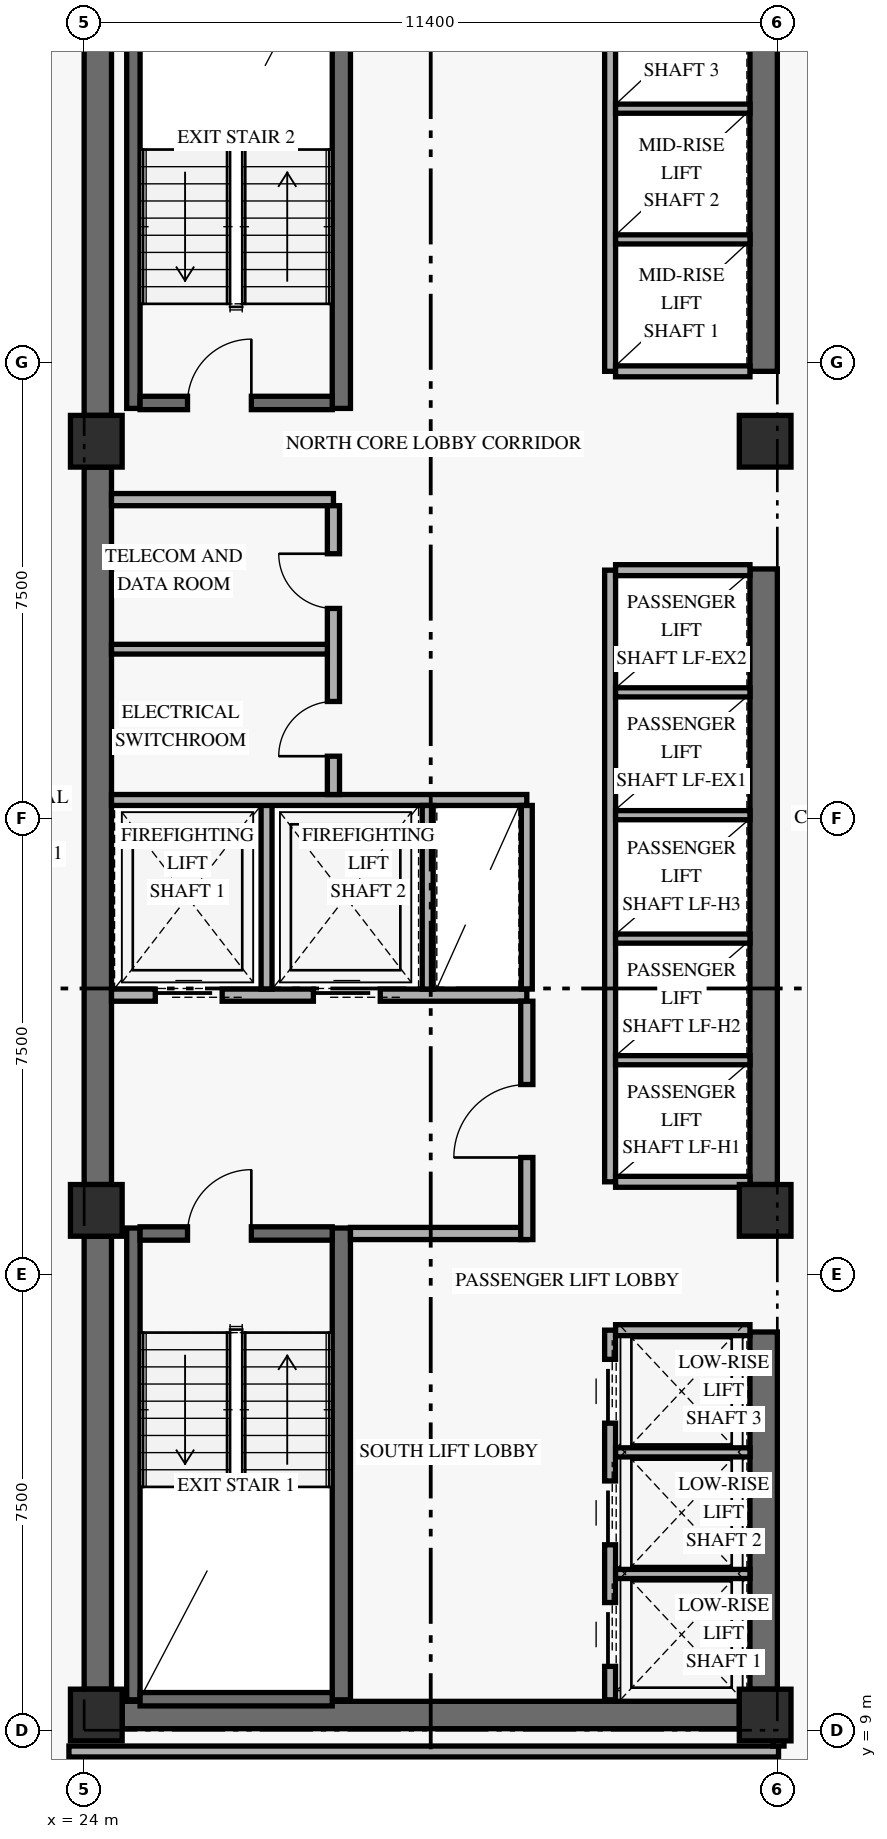
"""IFC4 building model, lengths in metres.
Left out: names, types, materials, properties, quantities, classifications, styles, units other than length and angle.
Written with IfcOpenShell. Run it as: python <this file> out.ifc"""

import sys

from ifc_helpers import new_model, si_unit, direction, frame, frame_2d, origin, origin_2d, place, context, subcontext, project, spatial, rectangle, extrude, element, fill, save


model = new_model("IFC4")
c1 = context("Model", 3, precision=1e-05, world=origin(), true_north=direction((0.0, 1.0)))
c2 = subcontext(c1, "Body", "Model", "MODEL_VIEW")
j1 = project(units=[si_unit("LENGTHUNIT", "METRE"), si_unit("PLANEANGLEUNIT", "RADIAN")], contexts=[c1])
p1 = place(None, origin())
s1 = spatial("IfcSite", under=j1, at=p1, CompositionType="ELEMENT")
p2 = place(p1, origin())
s2 = spatial("IfcBuilding", under=s1, at=p2, CompositionType="ELEMENT")
p3 = place(p2, frame((0.0, 0.0, 27.6)))
s3 = spatial("IfcBuildingStorey", under=s2, at=p3, CompositionType="ELEMENT", Elevation=27.6)
p4 = place(p3, frame((24.225, 9.675, 0.0), z_axis=(0.0, 0.0, 1.0), x_axis=(0.0, 1.0, 0.0)))
e1 = element("IfcWall", 1, at=p4, inside=s3, PredefinedType="SHEAR", context=c2, shape_type="SweptSolid", body=[
    extrude(rectangle(XDim=7.45, YDim=0.45, at=frame_2d((3.725, 0.0))), origin(), (0.0, 0.0, 1.0), 2.667),
])
p5 = place(p3, frame((24.225, 17.975, 0.0), z_axis=(0.0, 0.0, 1.0), x_axis=(0.0, 1.0, 0.0)))
e2 = element("IfcWall", 2, at=p5, inside=s3, PredefinedType="SHEAR", context=c2, shape_type="SweptSolid", body=[
    extrude(rectangle(XDim=11.8, YDim=0.45, at=frame_2d((5.9, 0.0))), origin(), (0.0, 0.0, 1.0), 2.667),
])
p6 = place(p3, frame((24.225, 30.625, 0.0), z_axis=(0.0, 0.0, 1.0), x_axis=(0.0, 1.0, 0.0)))
e3 = element("IfcWall", 3, at=p6, inside=s3, PredefinedType="SHEAR", context=c2, shape_type="SweptSolid", body=[
    extrude(rectangle(XDim=7.7, YDim=0.45, at=frame_2d((3.85, 0.0))), origin(), (0.0, 0.0, 1.0), 2.667),
])
p7 = place(p3, frame((35.175, 9.675, 0.0), z_axis=(0.0, 0.0, 1.0), x_axis=(0.0, 1.0, 0.0)))
e4 = element("IfcWall", 4, at=p7, inside=s3, PredefinedType="SHEAR", context=c2, shape_type="SweptSolid", body=[
    extrude(rectangle(XDim=5.875, YDim=0.45, at=frame_2d((2.938, 0.0))), origin(), (0.0, 0.0, 1.0), 2.667),
])
p8 = place(p3, frame((35.175, 17.975, 0.0), z_axis=(0.0, 0.0, 1.0), x_axis=(0.0, 1.0, 0.0)))
e5 = element("IfcWall", 5, at=p8, inside=s3, PredefinedType="SHEAR", context=c2, shape_type="SweptSolid", body=[
    extrude(rectangle(XDim=10.125, YDim=0.45, at=frame_2d((5.062, 0.0))), origin(), (0.0, 0.0, 1.0), 2.667),
])
p9 = place(p3, frame((35.175, 31.35, 0.0), z_axis=(0.0, 0.0, 1.0), x_axis=(0.0, 1.0, 0.0)))
e6 = element("IfcWall", 6, at=p9, inside=s3, PredefinedType="SHEAR", context=c2, shape_type="SweptSolid", body=[
    extrude(rectangle(XDim=6.975, YDim=0.45, at=frame_2d((3.487, 0.0))), origin(), (0.0, 0.0, 1.0), 2.667),
])
p10 = place(p3, frame((24.625, 9.25, 0.0), z_axis=(0.0, 0.0, 1.0), x_axis=(1.0, 0.0, 0.0)))
e7 = element("IfcWall", 7, at=p10, inside=s3, PredefinedType="SHEAR", context=c2, shape_type="SweptSolid", body=[
    extrude(rectangle(XDim=10.15, YDim=0.45, at=frame_2d((5.075, 0.0))), origin(), (0.0, 0.0, 1.0), 3.36),
])
p11 = place(p3, frame((24.81, 9.5, 0.0), z_axis=(0.0, 0.0, 1.0), x_axis=(0.0, 1.0, 0.0)))
e8 = element("IfcWall", 8, at=p11, inside=s3, PredefinedType="SHEAR", context=c2, shape_type="SweptSolid", body=[
    extrude(rectangle(XDim=7.76, YDim=0.22, at=frame_2d((3.88, 0.0))), origin(), (0.0, 0.0, 1.0), 3.36),
])
p12 = place(p3, frame((28.23, 9.5, 0.0), z_axis=(0.0, 0.0, 1.0), x_axis=(0.0, 1.0, 0.0)))
e9 = element("IfcWall", 9, at=p12, inside=s3, PredefinedType="SHEAR", context=c2, shape_type="SweptSolid", body=[
    extrude(rectangle(XDim=7.76, YDim=0.3, at=frame_2d((3.88, 0.0))), origin(), (0.0, 0.0, 1.0), 3.36),
])
p13 = place(p3, frame((24.92, 9.51, 0.0), z_axis=(0.0, 0.0, 1.0), x_axis=(1.0, 0.0, 0.0)))
e10 = element("IfcWall", 10, at=p13, inside=s3, PredefinedType="SHEAR", context=c2, shape_type="SweptSolid", body=[
    extrude(rectangle(XDim=3.16, YDim=0.22, at=frame_2d((1.58, 0.0))), origin(), (0.0, 0.0, 1.0), 3.36),
])
p14 = place(p3, frame((24.92, 17.17, 0.0), z_axis=(0.0, 0.0, 1.0), x_axis=(1.0, 0.0, 0.0)))
e11 = element("IfcWall", 11, at=p14, inside=s3, PredefinedType="SHEAR", context=c2, shape_type="SweptSolid", body=[
    extrude(rectangle(XDim=3.16, YDim=0.22, at=frame_2d((1.58, 0.0))), origin(), (0.0, 0.0, 1.0), 3.36),
])
p15 = place(p14, frame((0.78, 0.0, 0.0)))
e12 = element("IfcOpeningElement", 12, at=p15, cuts=e11, PredefinedType="OPENING", context=c2, shape_type="SweptSolid", body=[
    extrude(rectangle(XDim=1.05, YDim=2.15, at=frame_2d((0.525, 1.075))), frame((0.0, 0.12, 0.0), z_axis=(0.0, -1.0, 0.0), x_axis=(1.0, 0.0, 0.0)), (0.0, 0.0, 1.0), 0.24),
])
p16 = place(p3, frame((24.81, 30.74, 0.0), z_axis=(0.0, 0.0, 1.0), x_axis=(0.0, 1.0, 0.0)))
e13 = element("IfcWall", 13, at=p16, inside=s3, PredefinedType="SHEAR", context=c2, shape_type="SweptSolid", body=[
    extrude(rectangle(XDim=7.76, YDim=0.22, at=frame_2d((3.88, 0.0))), origin(), (0.0, 0.0, 1.0), 3.36),
])
p17 = place(p3, frame((28.23, 30.74, 0.0), z_axis=(0.0, 0.0, 1.0), x_axis=(0.0, 1.0, 0.0)))
e14 = element("IfcWall", 14, at=p17, inside=s3, PredefinedType="SHEAR", context=c2, shape_type="SweptSolid", body=[
    extrude(rectangle(XDim=7.76, YDim=0.3, at=frame_2d((3.88, 0.0))), origin(), (0.0, 0.0, 1.0), 3.36),
])
p18 = place(p3, frame((24.92, 30.83, 0.0), z_axis=(0.0, 0.0, 1.0), x_axis=(1.0, 0.0, 0.0)))
e15 = element("IfcWall", 15, at=p18, inside=s3, PredefinedType="SHEAR", context=c2, shape_type="SweptSolid", body=[
    extrude(rectangle(XDim=3.16, YDim=0.22, at=frame_2d((1.58, 0.0))), origin(), (0.0, 0.0, 1.0), 3.36),
])
p19 = place(p18, frame((0.78, 0.0, 0.0)))
e16 = element("IfcOpeningElement", 16, at=p19, cuts=e15, PredefinedType="OPENING", context=c2, shape_type="SweptSolid", body=[
    extrude(rectangle(XDim=1.05, YDim=2.15, at=frame_2d((0.525, 1.075))), frame((0.0, 0.12, 0.0), z_axis=(0.0, -1.0, 0.0), x_axis=(1.0, 0.0, 0.0)), (0.0, 0.0, 1.0), 0.24),
])
for number, where, z_axis, x_axis in (
    (17, (24.2, 9.25, 0.0), (0.0, 0.0, 1.0), (1.0, 0.0, 0.0)),
    (18, (24.2, 17.55, 0.0), (0.0, 0.0, 1.0), (1.0, 0.0, 0.0)),
    (19, (24.2, 30.2, 0.0), (0.0, 0.0, 1.0), (1.0, 0.0, 0.0)),
    (20, (35.2, 9.25, 0.0), (0.0, 0.0, 1.0), (1.0, 0.0, 0.0)),
    (21, (35.2, 17.55, 0.0), (0.0, 0.0, 1.0), (1.0, 0.0, 0.0)),
    (22, (35.2, 30.2, 0.0), (0.0, 0.0, 1.0), (1.0, 0.0, 0.0)),
):
    element("IfcColumn", number, at=place(p3, frame(where, z_axis=z_axis, x_axis=x_axis)), inside=s3, PredefinedType="COLUMN", context=c2, shape_type="SweptSolid", body=[
        extrude(rectangle(XDim=0.85, YDim=0.85, at=origin_2d()), origin(), (0.0, 0.0, 1.0), 3.6),
    ])
p20 = place(p3, frame((24.45, 21.09, 0.0), z_axis=(0.0, 0.0, 1.0), x_axis=(1.0, 0.0, 0.0)))
e23 = element("IfcWall", 23, at=p20, inside=s3, PredefinedType="STANDARD", context=c2, shape_type="SweptSolid", body=[
    extrude(rectangle(XDim=6.83, YDim=0.2, at=frame_2d((3.415, 0.0))), origin(), (0.0, 0.0, 1.0), 3.36),
])
p21 = place(p20, frame((0.72, 0.0, 0.0)))
e24 = element("IfcOpeningElement", 24, at=p21, cuts=e23, PredefinedType="OPENING", context=c2, shape_type="SweptSolid", body=[
    extrude(rectangle(XDim=1.1, YDim=2.2, at=frame_2d((0.55, 1.1))), frame((0.0, 0.11, 0.0), z_axis=(0.0, -1.0, 0.0), x_axis=(1.0, 0.0, 0.0)), (0.0, 0.0, 1.0), 0.22),
])
p22 = place(p20, frame((3.32, 0.0, 0.0)))
e25 = element("IfcOpeningElement", 25, at=p22, cuts=e23, PredefinedType="OPENING", context=c2, shape_type="SweptSolid", body=[
    extrude(rectangle(XDim=1.1, YDim=2.2, at=frame_2d((0.55, 1.1))), frame((0.0, 0.11, 0.0), z_axis=(0.0, -1.0, 0.0), x_axis=(1.0, 0.0, 0.0)), (0.0, 0.0, 1.0), 0.22),
])
p23 = place(p3, frame((28.38, 17.17, 0.0), z_axis=(0.0, 0.0, 1.0), x_axis=(1.0, 0.0, 0.0)))
e26 = element("IfcWall", 26, at=p23, inside=s3, PredefinedType="STANDARD", context=c2, shape_type="SweptSolid", body=[
    extrude(rectangle(XDim=2.9, YDim=0.2, at=frame_2d((1.45, 0.0))), origin(), (0.0, 0.0, 1.0), 3.36),
])
p24 = place(p3, frame((31.28, 17.07, 0.0), z_axis=(0.0, 0.0, 1.0), x_axis=(0.0, 1.0, 0.0)))
e27 = element("IfcWall", 27, at=p24, inside=s3, PredefinedType="STANDARD", context=c2, shape_type="SweptSolid", body=[
    extrude(rectangle(XDim=3.92, YDim=0.2, at=frame_2d((1.96, 0.0))), origin(), (0.0, 0.0, 1.0), 2.649),
])
p25 = place(p24, frame((1.35, 0.0, 0.0)))
e28 = element("IfcOpeningElement", 28, at=p25, cuts=e27, PredefinedType="OPENING", context=c2, shape_type="SweptSolid", body=[
    extrude(rectangle(XDim=1.2, YDim=2.15, at=frame_2d((0.6, 1.075))), frame((0.0, 0.11, 0.0), z_axis=(0.0, -1.0, 0.0), x_axis=(1.0, 0.0, 0.0)), (0.0, 0.0, 1.0), 0.22),
])
p26 = place(p3, frame((27.0, 21.19, 0.0), z_axis=(0.0, 0.0, 1.0), x_axis=(0.0, 1.0, 0.0)))
e29 = element("IfcWall", 29, at=p26, inside=s3, PredefinedType="STANDARD", context=c2, shape_type="SweptSolid", body=[
    extrude(rectangle(XDim=3.11, YDim=0.18, at=frame_2d((1.555, 0.0))), origin(), (0.0, 0.0, 1.0), 3.36),
])
p27 = place(p3, frame((24.45, 24.3, 0.0), z_axis=(0.0, 0.0, 1.0), x_axis=(1.0, 0.0, 0.0)))
e30 = element("IfcWall", 30, at=p27, inside=s3, PredefinedType="STANDARD", context=c2, shape_type="SweptSolid", body=[
    extrude(rectangle(XDim=6.83, YDim=0.18, at=frame_2d((3.415, 0.0))), origin(), (0.0, 0.0, 1.0), 3.36),
])
for number, where, z_axis, x_axis in (
    (31, (29.65, 21.19, 0.0), (0.0, 0.0, 1.0), (0.0, 1.0, 0.0)),
    (32, (31.28, 21.19, 0.0), (0.0, 0.0, 1.0), (0.0, 1.0, 0.0)),
):
    element("IfcWall", number, at=place(p3, frame(where, z_axis=z_axis, x_axis=x_axis)), inside=s3, PredefinedType="STANDARD", context=c2, shape_type="SweptSolid", body=[
        extrude(rectangle(XDim=3.02, YDim=0.18, at=frame_2d((1.51, 0.0))), origin(), (0.0, 0.0, 1.0), 3.36),
    ])
p28 = place(p3, frame((24.45, 29.24, 0.0), z_axis=(0.0, 0.0, 1.0), x_axis=(1.0, 0.0, 0.0)))
e33 = element("IfcWall", 33, at=p28, inside=s3, PredefinedType="STANDARD", context=c2, shape_type="SweptSolid", body=[
    extrude(rectangle(XDim=3.65, YDim=0.2, at=frame_2d((1.825, 0.0))), origin(), (0.0, 0.0, 1.0), 3.36),
])
p29 = place(p3, frame((28.1, 24.39, 0.0), z_axis=(0.0, 0.0, 1.0), x_axis=(0.0, 1.0, 0.0)))
e34 = element("IfcWall", 34, at=p29, inside=s3, PredefinedType="STANDARD", context=c2, shape_type="SweptSolid", body=[
    extrude(rectangle(XDim=4.75, YDim=0.2, at=frame_2d((2.375, 0.0))), origin(), (0.0, 0.0, 1.0), 3.36),
])
p30 = place(p29, frame((0.63, 0.0, 0.0)))
e35 = element("IfcOpeningElement", 35, at=p30, cuts=e34, PredefinedType="OPENING", context=c2, shape_type="SweptSolid", body=[
    extrude(rectangle(XDim=0.9, YDim=2.1, at=frame_2d((0.45, 1.05))), frame((0.0, 0.11, 0.0), z_axis=(0.0, -1.0, 0.0), x_axis=(1.0, 0.0, 0.0)), (0.0, 0.0, 1.0), 0.22),
])
p31 = place(p29, frame((3.06, 0.0, 0.0)))
e36 = element("IfcOpeningElement", 36, at=p31, cuts=e34, PredefinedType="OPENING", context=c2, shape_type="SweptSolid", body=[
    extrude(rectangle(XDim=0.9, YDim=2.1, at=frame_2d((0.45, 1.05))), frame((0.0, 0.11, 0.0), z_axis=(0.0, -1.0, 0.0), x_axis=(1.0, 0.0, 0.0)), (0.0, 0.0, 1.0), 0.22),
])
p32 = place(p3, frame((24.45, 26.78, 0.0), z_axis=(0.0, 0.0, 1.0), x_axis=(1.0, 0.0, 0.0)))
e37 = element("IfcWall", 37, at=p32, inside=s3, PredefinedType="PARTITIONING", context=c2, shape_type="SweptSolid", body=[
    extrude(rectangle(XDim=3.55, YDim=0.16, at=frame_2d((1.775, 0.0))), origin(), (0.0, 0.0, 1.0), 3.36),
])
p33 = place(p3, frame((32.65, 9.5, 0.0), z_axis=(0.0, 0.0, 1.0), x_axis=(0.0, 1.0, 0.0)))
e38 = element("IfcWall", 38, at=p33, inside=s3, PredefinedType="STANDARD", context=c2, shape_type="SweptSolid", body=[
    extrude(rectangle(XDim=6.08, YDim=0.18, at=frame_2d((3.04, 0.0))), origin(), (0.0, 0.0, 1.0), 3.36),
])
p34 = place(p33, frame((0.55, 0.0, 0.0)))
e39 = element("IfcOpeningElement", 39, at=p34, cuts=e38, PredefinedType="OPENING", context=c2, shape_type="SweptSolid", body=[
    extrude(rectangle(XDim=1.05, YDim=2.2, at=frame_2d((0.525, 1.1))), frame((0.0, 0.1, 0.0), z_axis=(0.0, -1.0, 0.0), x_axis=(1.0, 0.0, 0.0)), (0.0, 0.0, 1.0), 0.2),
])
p35 = place(p33, frame((2.55, 0.0, 0.0)))
e40 = element("IfcOpeningElement", 40, at=p35, cuts=e38, PredefinedType="OPENING", context=c2, shape_type="SweptSolid", body=[
    extrude(rectangle(XDim=1.05, YDim=2.2, at=frame_2d((0.525, 1.1))), frame((0.0, 0.1, 0.0), z_axis=(0.0, -1.0, 0.0), x_axis=(1.0, 0.0, 0.0)), (0.0, 0.0, 1.0), 0.2),
])
p36 = place(p33, frame((4.55, 0.0, 0.0)))
e41 = element("IfcOpeningElement", 41, at=p36, cuts=e38, PredefinedType="OPENING", context=c2, shape_type="SweptSolid", body=[
    extrude(rectangle(XDim=1.05, YDim=2.2, at=frame_2d((0.525, 1.1))), frame((0.0, 0.1, 0.0), z_axis=(0.0, -1.0, 0.0), x_axis=(1.0, 0.0, 0.0)), (0.0, 0.0, 1.0), 0.2),
])
p37 = place(p3, frame((32.74, 15.58, 0.0), z_axis=(0.0, 0.0, 1.0), x_axis=(1.0, 0.0, 0.0)))
e42 = element("IfcWall", 42, at=p37, inside=s3, PredefinedType="STANDARD", context=c2, shape_type="SweptSolid", body=[
    extrude(rectangle(XDim=2.21, YDim=0.18, at=frame_2d((1.105, 0.0))), origin(), (0.0, 0.0, 1.0), 3.36),
])
for number, where, z_axis, x_axis in (
    (43, (32.74, 11.57, 0.0), (0.0, 0.0, 1.0), (1.0, 0.0, 0.0)),
    (44, (32.74, 13.57, 0.0), (0.0, 0.0, 1.0), (1.0, 0.0, 0.0)),
):
    element("IfcWall", number, at=place(p3, frame(where, z_axis=z_axis, x_axis=x_axis)), inside=s3, PredefinedType="STANDARD", context=c2, shape_type="SweptSolid", body=[
        extrude(rectangle(XDim=2.21, YDim=0.15, at=frame_2d((1.105, 0.0))), origin(), (0.0, 0.0, 1.0), 3.36),
    ])
p38 = place(p3, frame((32.65, 18.02, 0.0), z_axis=(0.0, 0.0, 1.0), x_axis=(0.0, 1.0, 0.0)))
e45 = element("IfcWall", 45, at=p38, inside=s3, PredefinedType="STANDARD", context=c2, shape_type="SweptSolid", body=[
    extrude(rectangle(XDim=10.06, YDim=0.18, at=frame_2d((5.03, 0.0))), origin(), (0.0, 0.0, 1.0), 3.36),
])
for number, where, z_axis, x_axis in (
    (46, (32.74, 18.02, 0.0), (0.0, 0.0, 1.0), (1.0, 0.0, 0.0)),
    (47, (32.74, 28.08, 0.0), (0.0, 0.0, 1.0), (1.0, 0.0, 0.0)),
):
    element("IfcWall", number, at=place(p3, frame(where, z_axis=z_axis, x_axis=x_axis)), inside=s3, PredefinedType="STANDARD", context=c2, shape_type="SweptSolid", body=[
        extrude(rectangle(XDim=2.21, YDim=0.18, at=frame_2d((1.105, 0.0))), origin(), (0.0, 0.0, 1.0), 3.36),
    ])
for number, where, z_axis, x_axis in (
    (48, (32.74, 20.02, 0.0), (0.0, 0.0, 1.0), (1.0, 0.0, 0.0)),
    (49, (32.74, 22.02, 0.0), (0.0, 0.0, 1.0), (1.0, 0.0, 0.0)),
    (50, (32.74, 24.05, 0.0), (0.0, 0.0, 1.0), (1.0, 0.0, 0.0)),
    (51, (32.74, 26.07, 0.0), (0.0, 0.0, 1.0), (1.0, 0.0, 0.0)),
):
    element("IfcWall", number, at=place(p3, frame(where, z_axis=z_axis, x_axis=x_axis)), inside=s3, PredefinedType="STANDARD", context=c2, shape_type="SweptSolid", body=[
        extrude(rectangle(XDim=2.21, YDim=0.15, at=frame_2d((1.105, 0.0))), origin(), (0.0, 0.0, 1.0), 3.36),
    ])
p39 = place(p3, frame((32.65, 31.35, 0.0), z_axis=(0.0, 0.0, 1.0), x_axis=(0.0, 1.0, 0.0)))
e52 = element("IfcWall", 52, at=p39, inside=s3, PredefinedType="STANDARD", context=c2, shape_type="SweptSolid", body=[
    extrude(rectangle(XDim=7.175, YDim=0.18, at=frame_2d((3.587, 0.0))), origin(), (0.0, 0.0, 1.0), 3.36),
])
p40 = place(p3, frame((32.74, 31.35, 0.0), z_axis=(0.0, 0.0, 1.0), x_axis=(1.0, 0.0, 0.0)))
e53 = element("IfcWall", 53, at=p40, inside=s3, PredefinedType="STANDARD", context=c2, shape_type="SweptSolid", body=[
    extrude(rectangle(XDim=2.21, YDim=0.18, at=frame_2d((1.105, 0.0))), origin(), (0.0, 0.0, 1.0), 3.36),
])
for number, where, z_axis, x_axis in (
    (54, (32.74, 33.52, 0.0), (0.0, 0.0, 1.0), (1.0, 0.0, 0.0)),
    (55, (32.74, 35.67, 0.0), (0.0, 0.0, 1.0), (1.0, 0.0, 0.0)),
):
    element("IfcWall", number, at=place(p3, frame(where, z_axis=z_axis, x_axis=x_axis)), inside=s3, PredefinedType="STANDARD", context=c2, shape_type="SweptSolid", body=[
        extrude(rectangle(XDim=2.21, YDim=0.15, at=frame_2d((1.105, 0.0))), origin(), (0.0, 0.0, 1.0), 3.36),
    ])
p41 = place(p3, frame((23.75, 8.65, 0.0), z_axis=(0.0, 0.0, 1.0), x_axis=(1.0, 0.0, 0.0)))
e56 = element("IfcWall", 56, at=p41, inside=s3, PredefinedType="STANDARD", context=c2, shape_type="SweptSolid", body=[
    extrude(rectangle(XDim=11.67, YDim=0.18, at=frame_2d((5.835, 0.0))), origin(), (0.0, 0.0, 1.0), 2.649),
])
p42 = place(p3, frame((35.42, 8.74, 0.0), z_axis=(0.0, 0.0, 1.0), x_axis=(0.0, 1.0, 0.0)))
e57 = element("IfcWall", 57, at=p42, inside=s3, PredefinedType="STANDARD", context=c2, shape_type="SweptSolid", body=[
    extrude(rectangle(XDim=0.51, YDim=0.18, at=frame_2d((0.255, 0.0))), origin(), (0.0, 0.0, 1.0), 3.36),
])
p43 = place(p15, frame((1.05, 0.0, 0.0), z_axis=(0.0, 0.0, 1.0), x_axis=(-1.0, 0.0, 0.0)))
e58 = element("IfcDoor", 58, at=p43, inside=s3, OperationType="SINGLE_SWING_LEFT", PredefinedType="DOOR", context=c2, shape_type="SweptSolid", body=[
    extrude(rectangle(XDim=1.05, YDim=2.15, at=frame_2d((0.525, 1.075))), frame((0.0, 0.025, 0.0), z_axis=(0.0, -1.0, 0.0), x_axis=(1.0, 0.0, 0.0)), (0.0, 0.0, 1.0), 0.05),
])
fill(e12, e58)
p44 = place(p19, origin())
e59 = element("IfcDoor", 59, at=p44, inside=s3, OperationType="SINGLE_SWING_RIGHT", PredefinedType="DOOR", context=c2, shape_type="SweptSolid", body=[
    extrude(rectangle(XDim=1.05, YDim=2.15, at=frame_2d((0.525, 1.075))), frame((0.0, 0.025, 0.0), z_axis=(0.0, -1.0, 0.0), x_axis=(1.0, 0.0, 0.0)), (0.0, 0.0, 1.0), 0.05),
])
fill(e16, e59)
p45 = place(p21, origin())
e60 = element("IfcDoor", 60, at=p45, inside=s3, OperationType="SLIDING_TO_LEFT", PredefinedType="DOOR", context=c2, shape_type="SweptSolid", body=[
    extrude(rectangle(XDim=1.1, YDim=2.2, at=frame_2d((0.55, 1.1))), frame((0.0, 0.025, 0.0), z_axis=(0.0, -1.0, 0.0), x_axis=(1.0, 0.0, 0.0)), (0.0, 0.0, 1.0), 0.05),
])
fill(e24, e60)
p46 = place(p22, origin())
e61 = element("IfcDoor", 61, at=p46, inside=s3, OperationType="SLIDING_TO_LEFT", PredefinedType="DOOR", context=c2, shape_type="SweptSolid", body=[
    extrude(rectangle(XDim=1.1, YDim=2.2, at=frame_2d((0.55, 1.1))), frame((0.0, 0.025, 0.0), z_axis=(0.0, -1.0, 0.0), x_axis=(1.0, 0.0, 0.0)), (0.0, 0.0, 1.0), 0.05),
])
fill(e25, e61)
p47 = place(p25, origin())
e62 = element("IfcDoor", 62, at=p47, inside=s3, OperationType="SINGLE_SWING_LEFT", PredefinedType="DOOR", context=c2, shape_type="SweptSolid", body=[
    extrude(rectangle(XDim=1.2, YDim=2.15, at=frame_2d((0.6, 1.075))), frame((0.0, 0.025, 0.0), z_axis=(0.0, -1.0, 0.0), x_axis=(1.0, 0.0, 0.0)), (0.0, 0.0, 1.0), 0.05),
])
fill(e28, e62)
p48 = place(p30, origin())
e63 = element("IfcDoor", 63, at=p48, inside=s3, OperationType="SINGLE_SWING_LEFT", PredefinedType="DOOR", context=c2, shape_type="SweptSolid", body=[
    extrude(rectangle(XDim=0.9, YDim=2.1, at=frame_2d((0.45, 1.05))), frame((0.0, 0.025, 0.0), z_axis=(0.0, -1.0, 0.0), x_axis=(1.0, 0.0, 0.0)), (0.0, 0.0, 1.0), 0.05),
])
fill(e35, e63)
p49 = place(p31, origin())
e64 = element("IfcDoor", 64, at=p49, inside=s3, OperationType="SINGLE_SWING_RIGHT", PredefinedType="DOOR", context=c2, shape_type="SweptSolid", body=[
    extrude(rectangle(XDim=0.9, YDim=2.1, at=frame_2d((0.45, 1.05))), frame((0.0, 0.025, 0.0), z_axis=(0.0, -1.0, 0.0), x_axis=(1.0, 0.0, 0.0)), (0.0, 0.0, 1.0), 0.05),
])
fill(e36, e64)
p50 = place(p34, origin())
e65 = element("IfcDoor", 65, at=p50, inside=s3, OperationType="SLIDING_TO_LEFT", PredefinedType="DOOR", context=c2, shape_type="SweptSolid", body=[
    extrude(rectangle(XDim=1.05, YDim=2.2, at=frame_2d((0.525, 1.1))), frame((0.0, 0.025, 0.0), z_axis=(0.0, -1.0, 0.0), x_axis=(1.0, 0.0, 0.0)), (0.0, 0.0, 1.0), 0.05),
])
fill(e39, e65)
p51 = place(p35, origin())
e66 = element("IfcDoor", 66, at=p51, inside=s3, OperationType="SLIDING_TO_LEFT", PredefinedType="DOOR", context=c2, shape_type="SweptSolid", body=[
    extrude(rectangle(XDim=1.05, YDim=2.2, at=frame_2d((0.525, 1.1))), frame((0.0, 0.025, 0.0), z_axis=(0.0, -1.0, 0.0), x_axis=(1.0, 0.0, 0.0)), (0.0, 0.0, 1.0), 0.05),
])
fill(e40, e66)
p52 = place(p36, origin())
e67 = element("IfcDoor", 67, at=p52, inside=s3, OperationType="SLIDING_TO_LEFT", PredefinedType="DOOR", context=c2, shape_type="SweptSolid", body=[
    extrude(rectangle(XDim=1.05, YDim=2.2, at=frame_2d((0.525, 1.1))), frame((0.0, 0.025, 0.0), z_axis=(0.0, -1.0, 0.0), x_axis=(1.0, 0.0, 0.0)), (0.0, 0.0, 1.0), 0.05),
])
fill(e41, e67)
save(model, sys.argv[1])
